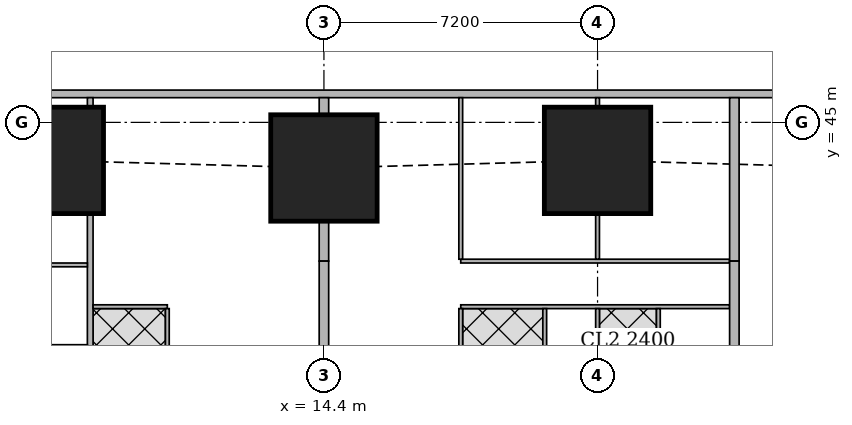
"""IFC4 building model, lengths in metres.
Left out: names, types, materials, properties, quantities, classifications, styles, units other than length and angle.
Written with IfcOpenShell. Run it as: python <this file> out.ifc"""

import sys

from ifc_helpers import new_model, si_unit, direction, frame, frame_2d, origin, origin_2d, place, context, subcontext, project, spatial, rectangle, extrude, element, fill, save


model = new_model("IFC4")
c1 = context("Model", 3, precision=1e-05, world=origin(), true_north=direction((0.0, 1.0)))
c2 = subcontext(c1, "Body", "Model", "MODEL_VIEW")
j1 = project(units=[si_unit("LENGTHUNIT", "METRE"), si_unit("PLANEANGLEUNIT", "RADIAN")], contexts=[c1])
p1 = place(None, origin())
s1 = spatial("IfcSite", under=j1, at=p1, CompositionType="ELEMENT")
p2 = place(p1, origin())
s2 = spatial("IfcBuilding", under=s1, at=p2, CompositionType="ELEMENT")
p3 = place(p2, frame((0.0, 0.0, 31.25)))
s3 = spatial("IfcBuildingStorey", under=s2, at=p3, CompositionType="ELEMENT", Elevation=31.25)
for number, where, z_axis, x_axis in (
    (1, (7.2, 44.0, 0.0), (0.0, 0.0, 1.0), (1.0, 0.0, 0.0)),
    (2, (14.4, 43.8, 0.0), (0.0, 0.0, 1.0), (1.0, 0.0, 0.0)),
    (3, (21.6, 44.0, 0.0), (0.0, 0.0, 1.0), (1.0, 0.0, 0.0)),
):
    element("IfcColumn", number, at=place(p3, frame(where, z_axis=z_axis, x_axis=x_axis)), inside=s3, PredefinedType="COLUMN", context=c2, shape_type="SweptSolid", body=[
        extrude(rectangle(XDim=2.8, YDim=2.8, at=origin_2d()), origin(), (0.0, 0.0, 1.0), 3.75),
    ])
p4 = place(p3, frame((40.106, 45.75, 0.0), z_axis=(0.0, 0.0, 1.0), x_axis=(-1.0, 0.0, 0.0)))
e4 = element("IfcWall", 4, at=p4, inside=s3, PredefinedType="SOLIDWALL", context=c2, shape_type="SweptSolid", body=[
    extrude(rectangle(XDim=37.943, YDim=0.2, at=frame_2d((18.971, 0.0))), origin(), (0.0, 0.0, 1.0), 3.5),
])
p5 = place(p4, frame((8.606, 0.0, 0.9)))
e5 = element("IfcOpeningElement", 5, at=p5, cuts=e4, PredefinedType="OPENING", context=c2, shape_type="SweptSolid", body=[
    extrude(rectangle(XDim=1.8, YDim=1.5, at=frame_2d((0.9, 0.75))), frame((0.0, 0.11, 0.0), z_axis=(0.0, -1.0, 0.0), x_axis=(1.0, 0.0, 0.0)), (0.0, 0.0, 1.0), 0.22),
])
p6 = place(p4, frame((12.206, 0.0, 0.9)))
e6 = element("IfcOpeningElement", 6, at=p6, cuts=e4, PredefinedType="OPENING", context=c2, shape_type="SweptSolid", body=[
    extrude(rectangle(XDim=1.8, YDim=1.5, at=frame_2d((0.9, 0.75))), frame((0.0, 0.11, 0.0), z_axis=(0.0, -1.0, 0.0), x_axis=(1.0, 0.0, 0.0)), (0.0, 0.0, 1.0), 0.22),
])
p7 = place(p4, frame((15.806, 0.0, 0.9)))
e7 = element("IfcOpeningElement", 7, at=p7, cuts=e4, PredefinedType="OPENING", context=c2, shape_type="SweptSolid", body=[
    extrude(rectangle(XDim=1.8, YDim=1.5, at=frame_2d((0.9, 0.75))), frame((0.0, 0.11, 0.0), z_axis=(0.0, -1.0, 0.0), x_axis=(1.0, 0.0, 0.0)), (0.0, 0.0, 1.0), 0.22),
])
p8 = place(p4, frame((19.406, 0.0, 0.9)))
e8 = element("IfcOpeningElement", 8, at=p8, cuts=e4, PredefinedType="OPENING", context=c2, shape_type="SweptSolid", body=[
    extrude(rectangle(XDim=1.8, YDim=1.5, at=frame_2d((0.9, 0.75))), frame((0.0, 0.11, 0.0), z_axis=(0.0, -1.0, 0.0), x_axis=(1.0, 0.0, 0.0)), (0.0, 0.0, 1.0), 0.22),
])
p9 = place(p4, frame((23.006, 0.0, 0.9)))
e9 = element("IfcOpeningElement", 9, at=p9, cuts=e4, PredefinedType="OPENING", context=c2, shape_type="SweptSolid", body=[
    extrude(rectangle(XDim=1.8, YDim=1.5, at=frame_2d((0.9, 0.75))), frame((0.0, 0.11, 0.0), z_axis=(0.0, -1.0, 0.0), x_axis=(1.0, 0.0, 0.0)), (0.0, 0.0, 1.0), 0.22),
])
p10 = place(p4, frame((26.606, 0.0, 0.9)))
e10 = element("IfcOpeningElement", 10, at=p10, cuts=e4, PredefinedType="OPENING", context=c2, shape_type="SweptSolid", body=[
    extrude(rectangle(XDim=1.8, YDim=1.5, at=frame_2d((0.9, 0.75))), frame((0.0, 0.11, 0.0), z_axis=(0.0, -1.0, 0.0), x_axis=(1.0, 0.0, 0.0)), (0.0, 0.0, 1.0), 0.22),
])
p11 = place(p3, frame((8.25, 2.426, 0.0), z_axis=(0.0, 0.0, 1.0), x_axis=(0.0, 1.0, 0.0)))
e11 = element("IfcWall", 11, at=p11, inside=s3, PredefinedType="SOLIDWALL", context=c2, shape_type="SweptSolid", body=[
    extrude(rectangle(XDim=40.173, YDim=0.15, at=frame_2d((20.086, 0.0))), origin(), (0.0, 0.0, 1.0), 3.5),
])
p12 = place(p11, frame((14.161, 0.0, 0.0)))
e12 = element("IfcOpeningElement", 12, at=p12, cuts=e11, PredefinedType="OPENING", context=c2, shape_type="SweptSolid", body=[
    extrude(rectangle(XDim=1.0, YDim=2.1, at=frame_2d((0.5, 1.05))), frame((0.0, 0.085, 0.0), z_axis=(0.0, -1.0, 0.0), x_axis=(1.0, 0.0, 0.0)), (0.0, 0.0, 1.0), 0.17),
])
p13 = place(p11, frame((17.487, 0.0, 0.0)))
e13 = element("IfcOpeningElement", 13, at=p13, cuts=e11, PredefinedType="OPENING", context=c2, shape_type="SweptSolid", body=[
    extrude(rectangle(XDim=1.0, YDim=2.1, at=frame_2d((0.5, 1.05))), frame((0.0, 0.085, 0.0), z_axis=(0.0, -1.0, 0.0), x_axis=(1.0, 0.0, 0.0)), (0.0, 0.0, 1.0), 0.17),
])
p14 = place(p11, frame((29.161, 0.0, 0.0)))
e14 = element("IfcOpeningElement", 14, at=p14, cuts=e11, PredefinedType="OPENING", context=c2, shape_type="SweptSolid", body=[
    extrude(rectangle(XDim=1.0, YDim=2.1, at=frame_2d((0.5, 1.05))), frame((0.0, 0.085, 0.0), z_axis=(0.0, -1.0, 0.0), x_axis=(1.0, 0.0, 0.0)), (0.0, 0.0, 1.0), 0.17),
])
p15 = place(p3, frame((8.25, 45.401, 0.0), z_axis=(0.0, 0.0, 1.0), x_axis=(0.0, 1.0, 0.0)))
e15 = element("IfcWall", 15, at=p15, inside=s3, PredefinedType="SOLIDWALL", context=c2, shape_type="SweptSolid", body=[
    extrude(rectangle(XDim=0.249, YDim=0.15, at=frame_2d((0.125, 0.0))), origin(), (0.0, 0.0, 1.0), 3.5),
])
for number, where, z_axis, x_axis in (
    (16, (4.9, 41.25, 0.0), (0.0, 0.0, 1.0), (1.0, 0.0, 0.0)),
    (17, (4.9, 39.1, 0.0), (0.0, 0.0, 1.0), (1.0, 0.0, 0.0)),
):
    element("IfcWall", number, at=place(p3, frame(where, z_axis=z_axis, x_axis=x_axis)), inside=s3, PredefinedType="PARTITIONING", context=c2, shape_type="SweptSolid", body=[
        extrude(rectangle(XDim=3.275, YDim=0.1, at=frame_2d((1.638, 0.0))), origin(), (0.0, 0.0, 1.0), 3.5),
    ])
p16 = place(p3, frame((8.325, 40.15, 0.0), z_axis=(0.0, 0.0, 1.0), x_axis=(1.0, 0.0, 0.0)))
e18 = element("IfcWall", 18, at=p16, inside=s3, PredefinedType="PARTITIONING", context=c2, shape_type="SweptSolid", body=[
    extrude(rectangle(XDim=1.954, YDim=0.1, at=frame_2d((0.977, 0.0))), origin(), (0.0, 0.0, 1.0), 3.5),
])
p17 = place(p16, frame((0.475, 0.0, 0.0)))
e19 = element("IfcOpeningElement", 19, at=p17, cuts=e18, PredefinedType="OPENING", context=c2, shape_type="SweptSolid", body=[
    extrude(rectangle(XDim=0.9, YDim=2.1, at=frame_2d((0.45, 1.05))), frame((0.0, 0.06, 0.0), z_axis=(0.0, -1.0, 0.0), x_axis=(1.0, 0.0, 0.0)), (0.0, 0.0, 1.0), 0.12),
])
p18 = place(p3, frame((10.279, 36.825, 0.0), z_axis=(0.0, 0.0, 1.0), x_axis=(0.0, 1.0, 0.0)))
e20 = element("IfcWall", 20, at=p18, inside=s3, PredefinedType="PARTITIONING", context=c2, shape_type="SweptSolid", body=[
    extrude(rectangle(XDim=3.275, YDim=0.1, at=frame_2d((1.638, 0.0))), origin(), (0.0, 0.0, 1.0), 3.5),
])
p19 = place(p3, frame((18.0, 41.35, 0.0), z_axis=(0.0, 0.0, 1.0), x_axis=(1.0, 0.0, 0.0)))
e21 = element("IfcWall", 21, at=p19, inside=s3, PredefinedType="PARTITIONING", context=c2, shape_type="SweptSolid", body=[
    extrude(rectangle(XDim=7.075, YDim=0.1, at=frame_2d((3.538, 0.0))), origin(), (0.0, 0.0, 1.0), 3.5),
])
p20 = place(p19, frame((0.2, 0.0, 0.0)))
e22 = element("IfcOpeningElement", 22, at=p20, cuts=e21, PredefinedType="OPENING", context=c2, shape_type="SweptSolid", body=[
    extrude(rectangle(XDim=0.9, YDim=2.1, at=frame_2d((0.45, 1.05))), frame((0.0, 0.06, 0.0), z_axis=(0.0, -1.0, 0.0), x_axis=(1.0, 0.0, 0.0)), (0.0, 0.0, 1.0), 0.12),
])
p21 = place(p19, frame((5.05, 0.0, 0.0)))
e23 = element("IfcOpeningElement", 23, at=p21, cuts=e21, PredefinedType="OPENING", context=c2, shape_type="SweptSolid", body=[
    extrude(rectangle(XDim=0.9, YDim=2.1, at=frame_2d((0.45, 1.05))), frame((0.0, 0.06, 0.0), z_axis=(0.0, -1.0, 0.0), x_axis=(1.0, 0.0, 0.0)), (0.0, 0.0, 1.0), 0.12),
])
p22 = place(p3, frame((18.0, 40.15, 0.0), z_axis=(0.0, 0.0, 1.0), x_axis=(1.0, 0.0, 0.0)))
e24 = element("IfcWall", 24, at=p22, inside=s3, PredefinedType="PARTITIONING", context=c2, shape_type="SweptSolid", body=[
    extrude(rectangle(XDim=7.075, YDim=0.1, at=frame_2d((3.538, 0.0))), origin(), (0.0, 0.0, 1.0), 3.5),
])
p23 = place(p22, frame((0.655, 0.0, 0.0)))
e25 = element("IfcOpeningElement", 25, at=p23, cuts=e24, PredefinedType="OPENING", context=c2, shape_type="SweptSolid", body=[
    extrude(rectangle(XDim=0.9, YDim=2.1, at=frame_2d((0.45, 1.05))), frame((0.0, 0.06, 0.0), z_axis=(0.0, -1.0, 0.0), x_axis=(1.0, 0.0, 0.0)), (0.0, 0.0, 1.0), 0.12),
])
p24 = place(p22, frame((3.95, 0.0, 0.0)))
e26 = element("IfcOpeningElement", 26, at=p24, cuts=e24, PredefinedType="OPENING", context=c2, shape_type="SweptSolid", body=[
    extrude(rectangle(XDim=0.9, YDim=2.1, at=frame_2d((0.45, 1.05))), frame((0.0, 0.06, 0.0), z_axis=(0.0, -1.0, 0.0), x_axis=(1.0, 0.0, 0.0)), (0.0, 0.0, 1.0), 0.12),
])
p25 = place(p22, frame((2.455, 0.0, 0.0)))
e27 = element("IfcOpeningElement", 27, at=p25, cuts=e24, PredefinedType="OPENING", context=c2, shape_type="SweptSolid", body=[
    extrude(rectangle(XDim=0.9, YDim=2.1, at=frame_2d((0.45, 1.05))), frame((0.0, 0.06, 0.0), z_axis=(0.0, -1.0, 0.0), x_axis=(1.0, 0.0, 0.0)), (0.0, 0.0, 1.0), 0.12),
])
p26 = place(p22, frame((5.75, 0.0, 0.0)))
e28 = element("IfcOpeningElement", 28, at=p26, cuts=e24, PredefinedType="OPENING", context=c2, shape_type="SweptSolid", body=[
    extrude(rectangle(XDim=0.9, YDim=2.1, at=frame_2d((0.45, 1.05))), frame((0.0, 0.06, 0.0), z_axis=(0.0, -1.0, 0.0), x_axis=(1.0, 0.0, 0.0)), (0.0, 0.0, 1.0), 0.12),
])
p27 = place(p3, frame((18.0, 41.4, 0.0), z_axis=(0.0, 0.0, 1.0), x_axis=(0.0, 1.0, 0.0)))
e29 = element("IfcWall", 29, at=p27, inside=s3, PredefinedType="PARTITIONING", context=c2, shape_type="SweptSolid", body=[
    extrude(rectangle(XDim=4.25, YDim=0.1, at=frame_2d((2.125, 0.0))), origin(), (0.0, 0.0, 1.0), 2.05),
])
p28 = place(p3, frame((21.6, 41.4, 0.0), z_axis=(0.0, 0.0, 1.0), x_axis=(0.0, 1.0, 0.0)))
e30 = element("IfcWall", 30, at=p28, inside=s3, PredefinedType="PARTITIONING", context=c2, shape_type="SweptSolid", body=[
    extrude(rectangle(XDim=1.199, YDim=0.1, at=frame_2d((0.6, 0.0))), origin(), (0.0, 0.0, 1.0), 3.5),
])
p29 = place(p3, frame((21.6, 45.401, 0.0), z_axis=(0.0, 0.0, 1.0), x_axis=(0.0, 1.0, 0.0)))
e31 = element("IfcWall", 31, at=p29, inside=s3, PredefinedType="PARTITIONING", context=c2, shape_type="SweptSolid", body=[
    extrude(rectangle(XDim=0.249, YDim=0.1, at=frame_2d((0.125, 0.0))), origin(), (0.0, 0.0, 1.0), 3.5),
])
p30 = place(p3, frame((18.0, 36.825, 0.0), z_axis=(0.0, 0.0, 1.0), x_axis=(0.0, 1.0, 0.0)))
e32 = element("IfcWall", 32, at=p30, inside=s3, PredefinedType="PARTITIONING", context=c2, shape_type="SweptSolid", body=[
    extrude(rectangle(XDim=3.275, YDim=0.1, at=frame_2d((1.638, 0.0))), origin(), (0.0, 0.0, 1.0), 3.5),
])
p31 = place(p3, frame((21.6, 38.401, 0.0), z_axis=(0.0, 0.0, 1.0), x_axis=(0.0, 1.0, 0.0)))
e33 = element("IfcWall", 33, at=p31, inside=s3, PredefinedType="PARTITIONING", context=c2, shape_type="SweptSolid", body=[
    extrude(rectangle(XDim=1.699, YDim=0.1, at=frame_2d((0.85, 0.0))), origin(), (0.0, 0.0, 1.0), 3.5),
])
for number, where, z_axis, x_axis in (
    (34, (20.21, 36.825, 0.0), (0.0, 0.0, 1.0), (0.0, 1.0, 0.0)),
    (35, (23.2, 36.825, 0.0), (0.0, 0.0, 1.0), (0.0, 1.0, 0.0)),
):
    element("IfcWall", number, at=place(p3, frame(where, z_axis=z_axis, x_axis=x_axis)), inside=s3, PredefinedType="PARTITIONING", context=c2, shape_type="SweptSolid", body=[
        extrude(rectangle(XDim=3.275, YDim=0.1, at=frame_2d((1.638, 0.0))), origin(), (0.0, 0.0, 1.0), 3.5),
    ])
p32 = place(p3, frame((14.4, 41.35, 0.0), z_axis=(0.0, 0.0, 1.0), x_axis=(0.0, 1.0, 0.0)))
e36 = element("IfcWall", 36, at=p32, inside=s3, PredefinedType="SOLIDWALL", context=c2, shape_type="SweptSolid", body=[
    extrude(rectangle(XDim=1.049, YDim=0.25, at=frame_2d((0.524, 0.0))), origin(), (0.0, 0.0, 1.0), 3.5),
])
p33 = place(p3, frame((14.4, 45.201, 0.0), z_axis=(0.0, 0.0, 1.0), x_axis=(0.0, 1.0, 0.0)))
e37 = element("IfcWall", 37, at=p33, inside=s3, PredefinedType="SOLIDWALL", context=c2, shape_type="SweptSolid", body=[
    extrude(rectangle(XDim=0.449, YDim=0.25, at=frame_2d((0.225, 0.0))), origin(), (0.0, 0.0, 1.0), 3.5),
])
p34 = place(p3, frame((14.4, 38.401, 0.0), z_axis=(0.0, 0.0, 1.0), x_axis=(0.0, 1.0, 0.0)))
e38 = element("IfcWall", 38, at=p34, inside=s3, PredefinedType="SOLIDWALL", context=c2, shape_type="SweptSolid", body=[
    extrude(rectangle(XDim=2.949, YDim=0.25, at=frame_2d((1.475, 0.0))), origin(), (0.0, 0.0, 1.0), 3.5),
])
p35 = place(p3, frame((25.2, 41.35, 0.0), z_axis=(0.0, 0.0, 1.0), x_axis=(0.0, 1.0, 0.0)))
e39 = element("IfcWall", 39, at=p35, inside=s3, PredefinedType="SOLIDWALL", context=c2, shape_type="SweptSolid", body=[
    extrude(rectangle(XDim=4.3, YDim=0.25, at=frame_2d((2.15, 0.0))), origin(), (0.0, 0.0, 1.0), 2.05),
])
p36 = place(p3, frame((25.2, 36.825, 0.0), z_axis=(0.0, 0.0, 1.0), x_axis=(0.0, 1.0, 0.0)))
e40 = element("IfcWall", 40, at=p36, inside=s3, PredefinedType="SOLIDWALL", context=c2, shape_type="SweptSolid", body=[
    extrude(rectangle(XDim=4.525, YDim=0.25, at=frame_2d((2.263, 0.0))), origin(), (0.0, 0.0, 1.0), 3.5),
])
p37 = place(p6, origin())
e41 = element("IfcWindow", 41, at=p37, inside=s3, PartitioningType="SINGLE_PANEL", PredefinedType="WINDOW", context=c2, shape_type="SweptSolid", body=[
    extrude(rectangle(XDim=1.8, YDim=1.5, at=frame_2d((0.9, 0.75))), frame((0.0, 0.03, 0.0), z_axis=(0.0, -1.0, 0.0), x_axis=(1.0, 0.0, 0.0)), (0.0, 0.0, 1.0), 0.06),
])
fill(e6, e41)
p38 = place(p7, origin())
e42 = element("IfcWindow", 42, at=p38, inside=s3, PartitioningType="SINGLE_PANEL", PredefinedType="WINDOW", context=c2, shape_type="SweptSolid", body=[
    extrude(rectangle(XDim=1.8, YDim=1.5, at=frame_2d((0.9, 0.75))), frame((0.0, 0.03, 0.0), z_axis=(0.0, -1.0, 0.0), x_axis=(1.0, 0.0, 0.0)), (0.0, 0.0, 1.0), 0.06),
])
fill(e7, e42)
p39 = place(p8, origin())
e43 = element("IfcWindow", 43, at=p39, inside=s3, PartitioningType="SINGLE_PANEL", PredefinedType="WINDOW", context=c2, shape_type="SweptSolid", body=[
    extrude(rectangle(XDim=1.8, YDim=1.5, at=frame_2d((0.9, 0.75))), frame((0.0, 0.03, 0.0), z_axis=(0.0, -1.0, 0.0), x_axis=(1.0, 0.0, 0.0)), (0.0, 0.0, 1.0), 0.06),
])
fill(e8, e43)
p40 = place(p9, origin())
e44 = element("IfcWindow", 44, at=p40, inside=s3, PartitioningType="SINGLE_PANEL", PredefinedType="WINDOW", context=c2, shape_type="SweptSolid", body=[
    extrude(rectangle(XDim=1.8, YDim=1.5, at=frame_2d((0.9, 0.75))), frame((0.0, 0.03, 0.0), z_axis=(0.0, -1.0, 0.0), x_axis=(1.0, 0.0, 0.0)), (0.0, 0.0, 1.0), 0.06),
])
fill(e9, e44)
p41 = place(p10, origin())
e45 = element("IfcWindow", 45, at=p41, inside=s3, PartitioningType="SINGLE_PANEL", PredefinedType="WINDOW", context=c2, shape_type="SweptSolid", body=[
    extrude(rectangle(XDim=1.8, YDim=1.5, at=frame_2d((0.9, 0.75))), frame((0.0, 0.03, 0.0), z_axis=(0.0, -1.0, 0.0), x_axis=(1.0, 0.0, 0.0)), (0.0, 0.0, 1.0), 0.06),
])
fill(e10, e45)
p42 = place(p17, origin())
e46 = element("IfcDoor", 46, at=p42, inside=s3, OperationType="SINGLE_SWING_RIGHT", PredefinedType="DOOR", context=c2, shape_type="SweptSolid", body=[
    extrude(rectangle(XDim=0.9, YDim=2.1, at=frame_2d((0.45, 1.05))), frame((0.0, 0.025, 0.0), z_axis=(0.0, -1.0, 0.0), x_axis=(1.0, 0.0, 0.0)), (0.0, 0.0, 1.0), 0.05),
])
fill(e19, e46)
p43 = place(p20, origin())
e47 = element("IfcDoor", 47, at=p43, inside=s3, OperationType="SINGLE_SWING_LEFT", PredefinedType="DOOR", context=c2, shape_type="SweptSolid", body=[
    extrude(rectangle(XDim=0.9, YDim=2.1, at=frame_2d((0.45, 1.05))), frame((0.0, 0.025, 0.0), z_axis=(0.0, -1.0, 0.0), x_axis=(1.0, 0.0, 0.0)), (0.0, 0.0, 1.0), 0.05),
])
fill(e22, e47)
p44 = place(p21, origin())
e48 = element("IfcDoor", 48, at=p44, inside=s3, OperationType="SINGLE_SWING_RIGHT", PredefinedType="DOOR", context=c2, shape_type="SweptSolid", body=[
    extrude(rectangle(XDim=0.9, YDim=2.1, at=frame_2d((0.45, 1.05))), frame((0.0, 0.025, 0.0), z_axis=(0.0, -1.0, 0.0), x_axis=(1.0, 0.0, 0.0)), (0.0, 0.0, 1.0), 0.05),
])
fill(e23, e48)
p45 = place(p23, origin())
e49 = element("IfcDoor", 49, at=p45, inside=s3, OperationType="SINGLE_SWING_RIGHT", PredefinedType="DOOR", context=c2, shape_type="SweptSolid", body=[
    extrude(rectangle(XDim=0.9, YDim=2.1, at=frame_2d((0.45, 1.05))), frame((0.0, 0.025, 0.0), z_axis=(0.0, -1.0, 0.0), x_axis=(1.0, 0.0, 0.0)), (0.0, 0.0, 1.0), 0.05),
])
fill(e25, e49)
p46 = place(p24, origin())
e50 = element("IfcDoor", 50, at=p46, inside=s3, OperationType="SINGLE_SWING_LEFT", PredefinedType="DOOR", context=c2, shape_type="SweptSolid", body=[
    extrude(rectangle(XDim=0.9, YDim=2.1, at=frame_2d((0.45, 1.05))), frame((0.0, 0.025, 0.0), z_axis=(0.0, -1.0, 0.0), x_axis=(1.0, 0.0, 0.0)), (0.0, 0.0, 1.0), 0.05),
])
fill(e26, e50)
p47 = place(p25, origin())
e51 = element("IfcDoor", 51, at=p47, inside=s3, OperationType="SINGLE_SWING_LEFT", PredefinedType="DOOR", context=c2, shape_type="SweptSolid", body=[
    extrude(rectangle(XDim=0.9, YDim=2.1, at=frame_2d((0.45, 1.05))), frame((0.0, 0.025, 0.0), z_axis=(0.0, -1.0, 0.0), x_axis=(1.0, 0.0, 0.0)), (0.0, 0.0, 1.0), 0.05),
])
fill(e27, e51)
p48 = place(p26, origin())
e52 = element("IfcDoor", 52, at=p48, inside=s3, OperationType="SINGLE_SWING_LEFT", PredefinedType="DOOR", context=c2, shape_type="SweptSolid", body=[
    extrude(rectangle(XDim=0.9, YDim=2.1, at=frame_2d((0.45, 1.05))), frame((0.0, 0.025, 0.0), z_axis=(0.0, -1.0, 0.0), x_axis=(1.0, 0.0, 0.0)), (0.0, 0.0, 1.0), 0.05),
])
fill(e28, e52)
save(model, sys.argv[1])
